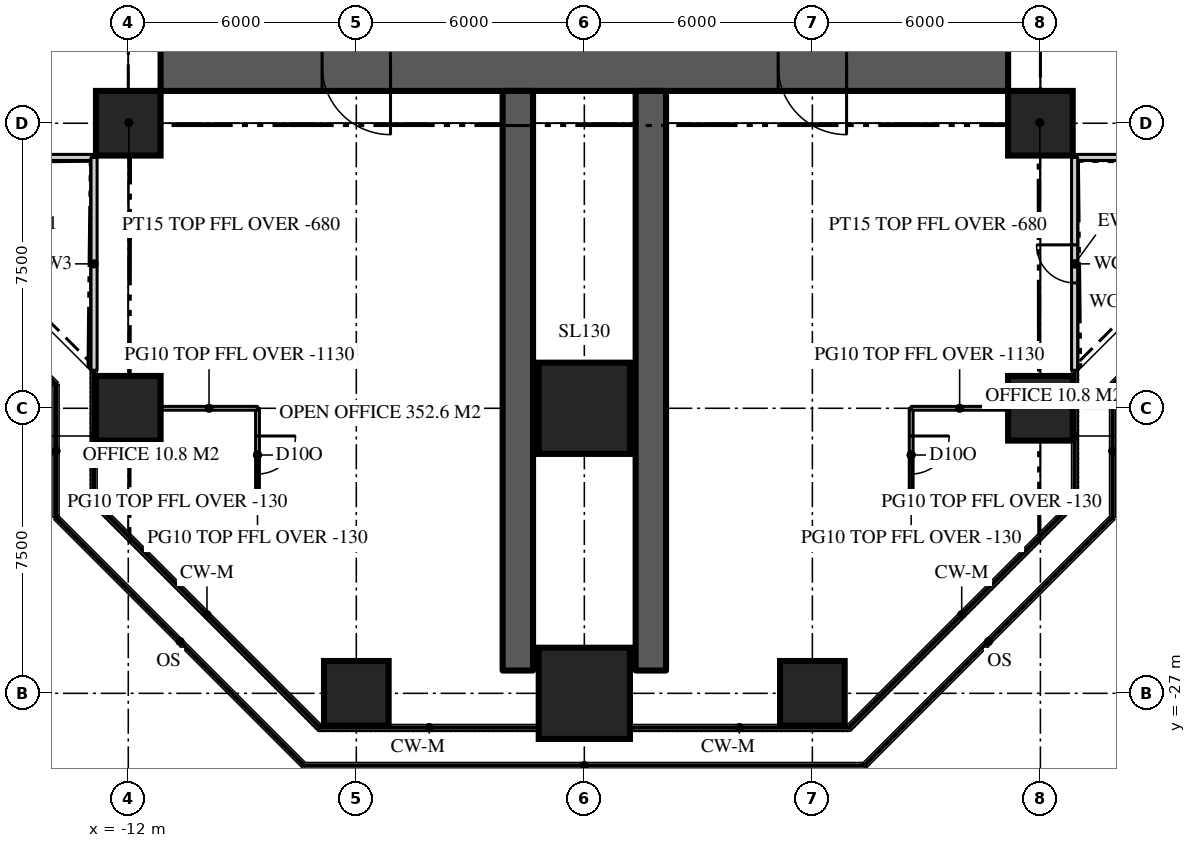
"""IFC4 building model, lengths in metres.
Left out: names, types, materials, properties, quantities, classifications, styles, units other than length and angle.
Written with IfcOpenShell. Run it as: python <this file> out.ifc"""

import sys

from ifc_helpers import new_model, si_unit, direction, frame, frame_2d, origin, origin_2d, place, context, subcontext, project, spatial, rectangle, extrude, element, fill, save


model = new_model("IFC4")
c1 = context("Model", 3, precision=1e-05, world=origin(), true_north=direction((0.0, 1.0)))
c2 = subcontext(c1, "Body", "Model", "MODEL_VIEW")
j1 = project(units=[si_unit("LENGTHUNIT", "METRE"), si_unit("PLANEANGLEUNIT", "RADIAN")], contexts=[c1])
p1 = place(None, origin())
s1 = spatial("IfcSite", under=j1, at=p1, CompositionType="ELEMENT")
p2 = place(p1, origin())
s2 = spatial("IfcBuilding", under=s1, at=p2, CompositionType="ELEMENT")
p3 = place(p2, frame((0.0, 0.0, 135.9)))
s3 = spatial("IfcBuildingStorey", under=s2, at=p3, CompositionType="ELEMENT", Elevation=135.9)
p4 = place(p3, frame((11.15, -10.5, 0.0), z_axis=(0.0, 0.0, 1.0), x_axis=(-1.0, 0.0, 0.0)))
e1 = element("IfcWall", 1, at=p4, inside=s3, PredefinedType="SHEAR", context=c2, shape_type="SweptSolid", body=[
    extrude(rectangle(XDim=22.3, YDim=1.3, at=frame_2d((11.15, 0.0))), origin(), (0.0, 0.0, 1.0), 3.9),
])
p5 = place(p4, frame((16.25, 0.0, 0.0)))
e2 = element("IfcOpeningElement", 2, at=p5, cuts=e1, PredefinedType="OPENING", context=c2, shape_type="SweptSolid", body=[
    extrude(rectangle(XDim=1.8, YDim=2.2, at=frame_2d((0.9, 1.1))), frame((0.0, 0.66, 0.0), z_axis=(0.0, -1.0, 0.0), x_axis=(1.0, 0.0, 0.0)), (0.0, 0.0, 1.0), 1.32),
])
p6 = place(p4, frame((4.25, 0.0, 0.0)))
e3 = element("IfcOpeningElement", 3, at=p6, cuts=e1, PredefinedType="OPENING", context=c2, shape_type="SweptSolid", body=[
    extrude(rectangle(XDim=1.8, YDim=2.2, at=frame_2d((0.9, 1.1))), frame((0.0, 0.66, 0.0), z_axis=(0.0, -1.0, 0.0), x_axis=(1.0, 0.0, 0.0)), (0.0, 0.0, 1.0), 1.32),
])
for number, where, z_axis, x_axis in (
    (4, (-1.75, -11.15, 0.0), (0.0, 0.0, 1.0), (0.0, -1.0, 0.0)),
    (5, (1.75, -11.15, 0.0), (0.0, 0.0, 1.0), (0.0, -1.0, 0.0)),
):
    element("IfcWall", number, at=place(p3, frame(where, z_axis=z_axis, x_axis=x_axis)), inside=s3, PredefinedType="SHEAR", context=c2, shape_type="SweptSolid", body=[
        extrude(rectangle(XDim=15.25, YDim=0.8, at=frame_2d((7.625, 0.0))), origin(), (0.0, 0.0, 1.0), 3.9),
    ])
p7 = place(p3, frame((-6.0, -27.0, 0.0), z_axis=(0.0, 0.0, 1.0), x_axis=(1.0, 0.0, 0.0)))
e6 = element("IfcColumn", 6, at=p7, inside=s3, PredefinedType="COLUMN", context=c2, shape_type="SweptSolid", body=[
    extrude(rectangle(XDim=1.7, YDim=1.7, at=origin_2d()), origin(), (0.0, 0.0, 1.0), 3.9),
])
p8 = place(p3, frame((0.0, -27.0, 0.0), z_axis=(0.0, 0.0, 1.0), x_axis=(1.0, 0.0, 0.0)))
e7 = element("IfcColumn", 7, at=p8, inside=s3, PredefinedType="COLUMN", context=c2, shape_type="SweptSolid", body=[
    extrude(rectangle(XDim=2.4, YDim=2.4, at=origin_2d()), origin(), (0.0, 0.0, 1.0), 3.9),
])
for number, where, z_axis, x_axis in (
    (8, (6.0, -27.0, 0.0), (0.0, 0.0, 1.0), (1.0, 0.0, 0.0)),
    (9, (-12.0, -19.5, 0.0), (0.0, 0.0, 1.0), (1.0, 0.0, 0.0)),
):
    element("IfcColumn", number, at=place(p3, frame(where, z_axis=z_axis, x_axis=x_axis)), inside=s3, PredefinedType="COLUMN", context=c2, shape_type="SweptSolid", body=[
        extrude(rectangle(XDim=1.7, YDim=1.7, at=origin_2d()), origin(), (0.0, 0.0, 1.0), 3.9),
    ])
p9 = place(p3, frame((0.0, -19.5, 0.0), z_axis=(0.0, 0.0, 1.0), x_axis=(1.0, 0.0, 0.0)))
e10 = element("IfcColumn", 10, at=p9, inside=s3, PredefinedType="COLUMN", context=c2, shape_type="SweptSolid", body=[
    extrude(rectangle(XDim=2.4, YDim=2.4, at=origin_2d()), origin(), (0.0, 0.0, 1.0), 3.9),
])
for number, where, z_axis, x_axis in (
    (11, (12.0, -19.5, 0.0), (0.0, 0.0, 1.0), (1.0, 0.0, 0.0)),
    (12, (-12.0, -12.0, 0.0), (0.0, 0.0, 1.0), (1.0, 0.0, 0.0)),
    (13, (12.0, -12.0, 0.0), (0.0, 0.0, 1.0), (1.0, 0.0, 0.0)),
):
    element("IfcColumn", number, at=place(p3, frame(where, z_axis=z_axis, x_axis=x_axis)), inside=s3, PredefinedType="COLUMN", context=c2, shape_type="SweptSolid", body=[
        extrude(rectangle(XDim=1.7, YDim=1.7, at=origin_2d()), origin(), (0.0, 0.0, 1.0), 3.9),
    ])
p10 = place(p3, frame((12.9, -12.9, 0.0), z_axis=(0.0, 0.0, 1.0), x_axis=(1.0, 0.0, 0.0)))
e14 = element("IfcWall", 14, at=p10, inside=s3, PredefinedType="SOLIDWALL", context=c2, shape_type="SweptSolid", body=[
    extrude(rectangle(XDim=5.6, YDim=0.16, at=frame_2d((2.8, 0.0))), origin(), (0.0, 0.0, 1.0), 3.77),
])
p11 = place(p3, frame((-18.5, -12.9, 0.0), z_axis=(0.0, 0.0, 1.0), x_axis=(1.0, 0.0, 0.0)))
e15 = element("IfcWall", 15, at=p11, inside=s3, PredefinedType="SOLIDWALL", context=c2, shape_type="SweptSolid", body=[
    extrude(rectangle(XDim=5.6, YDim=0.16, at=frame_2d((2.8, 0.0))), origin(), (0.0, 0.0, 1.0), 3.77),
])
p12 = place(p11, frame((2.3, 0.0, 0.0)))
e16 = element("IfcOpeningElement", 16, at=p12, cuts=e15, PredefinedType="OPENING", context=c2, shape_type="SweptSolid", body=[
    extrude(rectangle(XDim=1.0, YDim=2.2, at=frame_2d((0.5, 1.1))), frame((0.0, 0.09, 0.0), z_axis=(0.0, -1.0, 0.0), x_axis=(1.0, 0.0, 0.0)), (0.0, 0.0, 1.0), 0.18),
])
p13 = place(p3, frame((-12.9, -12.9, 0.0), z_axis=(0.0, 0.0, 1.0), x_axis=(0.0, -1.0, 0.0)))
e17 = element("IfcWall", 17, at=p13, inside=s3, PredefinedType="SOLIDWALL", context=c2, shape_type="SweptSolid", body=[
    extrude(rectangle(XDim=5.6, YDim=0.16, at=frame_2d((2.8, 0.0))), origin(), (0.0, 0.0, 1.0), 3.77),
])
p14 = place(p3, frame((12.9, -18.5, 0.0), z_axis=(0.0, 0.0, 1.0), x_axis=(0.0, 1.0, 0.0)))
e18 = element("IfcWall", 18, at=p14, inside=s3, PredefinedType="SOLIDWALL", context=c2, shape_type="SweptSolid", body=[
    extrude(rectangle(XDim=5.6, YDim=0.16, at=frame_2d((2.8, 0.0))), origin(), (0.0, 0.0, 1.0), 3.77),
])
p15 = place(p14, frame((2.3, 0.0, 0.0)))
e19 = element("IfcOpeningElement", 19, at=p15, cuts=e18, PredefinedType="OPENING", context=c2, shape_type="SweptSolid", body=[
    extrude(rectangle(XDim=1.0, YDim=2.2, at=frame_2d((0.5, 1.1))), frame((0.0, 0.09, 0.0), z_axis=(0.0, -1.0, 0.0), x_axis=(1.0, 0.0, 0.0)), (0.0, 0.0, 1.0), 0.18),
])
p16 = place(p3, frame((8.6, -19.5, 0.0), z_axis=(0.0, 0.0, 1.0), x_axis=(0.0, -1.0, 0.0)))
e20 = element("IfcWall", 20, at=p16, inside=s3, PredefinedType="PARTITIONING", context=c2, shape_type="SweptSolid", body=[
    extrude(rectangle(XDim=2.459, YDim=0.1, at=frame_2d((1.229, 0.0))), origin(), (0.0, 0.0, 1.0), 3.77),
])
p17 = place(p16, frame((0.729, 0.0, 0.0)))
e21 = element("IfcOpeningElement", 21, at=p17, cuts=e20, PredefinedType="OPENING", context=c2, shape_type="SweptSolid", body=[
    extrude(rectangle(XDim=1.0, YDim=2.2, at=frame_2d((0.5, 1.1))), frame((0.0, 0.06, 0.0), z_axis=(0.0, -1.0, 0.0), x_axis=(1.0, 0.0, 0.0)), (0.0, 0.0, 1.0), 0.12),
])
p18 = place(p3, frame((8.6, -19.5, 0.0), z_axis=(0.0, 0.0, 1.0), x_axis=(1.0, 0.0, 0.0)))
e22 = element("IfcWall", 22, at=p18, inside=s3, PredefinedType="PARTITIONING", context=c2, shape_type="SweptSolid", body=[
    extrude(rectangle(XDim=2.55, YDim=0.1, at=frame_2d((1.275, 0.0))), origin(), (0.0, 0.0, 1.0), 2.77),
])
p19 = place(p3, frame((8.6, -21.959, 0.0), z_axis=(0.0, 0.0, 1.0), x_axis=(1.0, 0.0, 0.0)))
e23 = element("IfcWall", 23, at=p19, inside=s3, PredefinedType="PARTITIONING", context=c2, shape_type="SweptSolid", body=[
    extrude(rectangle(XDim=4.22, YDim=0.1, at=frame_2d((2.11, 0.0))), origin(), (0.0, 0.0, 1.0), 3.77),
])
p20 = place(p3, frame((-8.6, -19.5, 0.0), z_axis=(0.0, 0.0, 1.0), x_axis=(0.0, -1.0, 0.0)))
e24 = element("IfcWall", 24, at=p20, inside=s3, PredefinedType="PARTITIONING", context=c2, shape_type="SweptSolid", body=[
    extrude(rectangle(XDim=2.459, YDim=0.1, at=frame_2d((1.229, 0.0))), origin(), (0.0, 0.0, 1.0), 3.77),
])
p21 = place(p20, frame((0.729, 0.0, 0.0)))
e25 = element("IfcOpeningElement", 25, at=p21, cuts=e24, PredefinedType="OPENING", context=c2, shape_type="SweptSolid", body=[
    extrude(rectangle(XDim=1.0, YDim=2.2, at=frame_2d((0.5, 1.1))), frame((0.0, 0.06, 0.0), z_axis=(0.0, -1.0, 0.0), x_axis=(1.0, 0.0, 0.0)), (0.0, 0.0, 1.0), 0.12),
])
p22 = place(p3, frame((-8.6, -19.5, 0.0), z_axis=(0.0, 0.0, 1.0), x_axis=(-1.0, 0.0, 0.0)))
e26 = element("IfcWall", 26, at=p22, inside=s3, PredefinedType="PARTITIONING", context=c2, shape_type="SweptSolid", body=[
    extrude(rectangle(XDim=2.55, YDim=0.1, at=frame_2d((1.275, 0.0))), origin(), (0.0, 0.0, 1.0), 2.77),
])
p23 = place(p3, frame((-8.6, -21.959, 0.0), z_axis=(0.0, 0.0, 1.0), x_axis=(-1.0, 0.0, 0.0)))
e27 = element("IfcWall", 27, at=p23, inside=s3, PredefinedType="PARTITIONING", context=c2, shape_type="SweptSolid", body=[
    extrude(rectangle(XDim=4.22, YDim=0.1, at=frame_2d((2.11, 0.0))), origin(), (0.0, 0.0, 1.0), 3.77),
])
for number, where, z_axis, x_axis in (
    (28, (-11.15, -11.15, 0.0), (0.0, 0.0, 1.0), (-0.707, -0.707, 0.0)),
    (29, (11.15, -11.15, 0.0), (0.0, 0.0, 1.0), (0.707, -0.707, 0.0)),
):
    element("IfcWall", number, at=place(p3, frame(where, z_axis=z_axis, x_axis=x_axis)), inside=s3, PredefinedType="PARTITIONING", context=c2, shape_type="SweptSolid", body=[
        extrude(rectangle(XDim=2.362, YDim=0.15, at=frame_2d((1.181, 0.0))), origin(), (0.0, 0.0, 1.0), 3.22),
    ])
p24 = place(p15, origin())
e30 = element("IfcDoor", 30, at=p24, inside=s3, OperationType="SINGLE_SWING_RIGHT", PredefinedType="DOOR", context=c2, shape_type="SweptSolid", body=[
    extrude(rectangle(XDim=1.0, YDim=2.2, at=frame_2d((0.5, 1.1))), frame((0.0, 0.025, 0.0), z_axis=(0.0, -1.0, 0.0), x_axis=(1.0, 0.0, 0.0)), (0.0, 0.0, 1.0), 0.05),
])
fill(e19, e30)
p25 = place(p5, origin())
e31 = element("IfcDoor", 31, at=p25, inside=s3, OperationType="DOUBLE_DOOR_DOUBLE_SWING", PredefinedType="DOOR", context=c2, shape_type="SweptSolid", body=[
    extrude(rectangle(XDim=1.8, YDim=2.2, at=frame_2d((0.9, 1.1))), frame((0.0, 0.025, 0.0), z_axis=(0.0, -1.0, 0.0), x_axis=(1.0, 0.0, 0.0)), (0.0, 0.0, 1.0), 0.05),
])
fill(e2, e31)
p26 = place(p6, origin())
e32 = element("IfcDoor", 32, at=p26, inside=s3, OperationType="DOUBLE_DOOR_DOUBLE_SWING", PredefinedType="DOOR", context=c2, shape_type="SweptSolid", body=[
    extrude(rectangle(XDim=1.8, YDim=2.2, at=frame_2d((0.9, 1.1))), frame((0.0, 0.025, 0.0), z_axis=(0.0, -1.0, 0.0), x_axis=(1.0, 0.0, 0.0)), (0.0, 0.0, 1.0), 0.05),
])
fill(e3, e32)
p27 = place(p17, origin())
e33 = element("IfcDoor", 33, at=p27, inside=s3, OperationType="SINGLE_SWING_LEFT", PredefinedType="DOOR", context=c2, shape_type="SweptSolid", body=[
    extrude(rectangle(XDim=1.0, YDim=2.2, at=frame_2d((0.5, 1.1))), frame((0.0, 0.025, 0.0), z_axis=(0.0, -1.0, 0.0), x_axis=(1.0, 0.0, 0.0)), (0.0, 0.0, 1.0), 0.05),
])
fill(e21, e33)
p28 = place(p21, origin())
e34 = element("IfcDoor", 34, at=p28, inside=s3, OperationType="SINGLE_SWING_LEFT", PredefinedType="DOOR", context=c2, shape_type="SweptSolid", body=[
    extrude(rectangle(XDim=1.0, YDim=2.2, at=frame_2d((0.5, 1.1))), frame((0.0, 0.025, 0.0), z_axis=(0.0, -1.0, 0.0), x_axis=(1.0, 0.0, 0.0)), (0.0, 0.0, 1.0), 0.05),
])
fill(e25, e34)
save(model, sys.argv[1])
